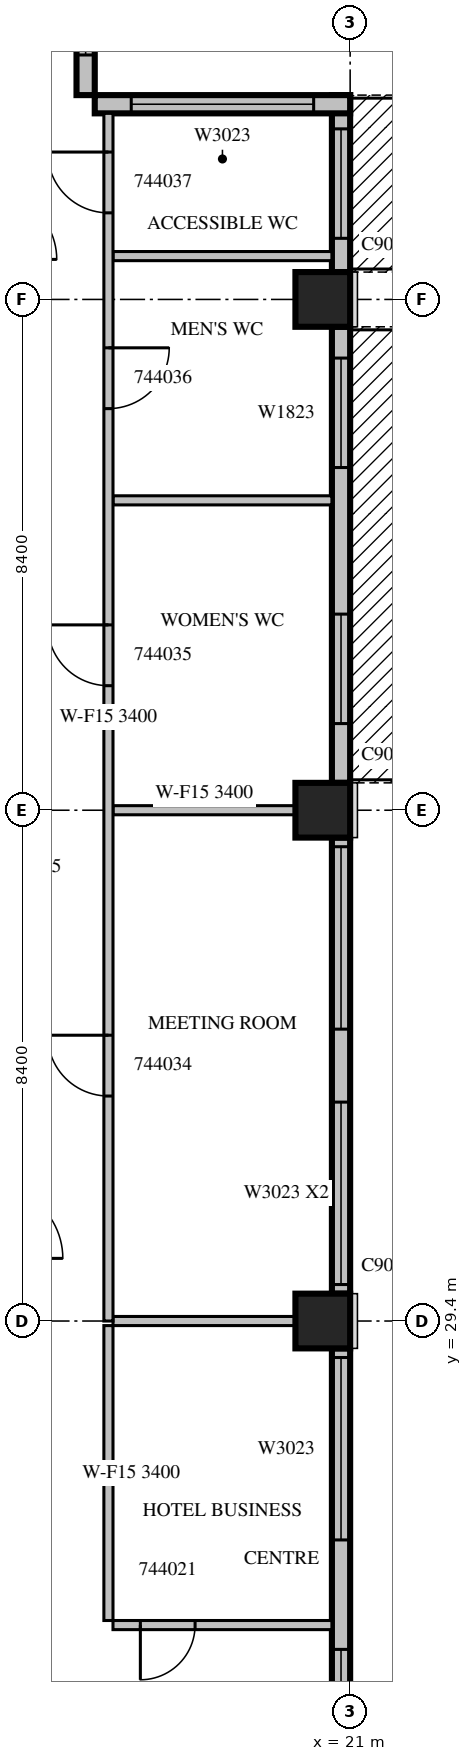
"""IFC4 building model, lengths in metres.
Left out: names, types, materials, properties, quantities, classifications, styles, units other than length and angle.
Written with IfcOpenShell. Run it as: python <this file> out.ifc"""

import sys

from ifc_helpers import new_model, si_unit, direction, frame, frame_2d, origin, origin_2d, place, context, subcontext, project, spatial, rectangle, extrude, source, transform, mapped, element, fill, save


model = new_model("IFC4")
c1 = context("Model", 3, precision=1e-05, world=origin(), true_north=direction((0.0, 1.0)))
c2 = subcontext(c1, "Body", "Model", "MODEL_VIEW")
j1 = project(units=[si_unit("LENGTHUNIT", "METRE"), si_unit("PLANEANGLEUNIT", "RADIAN")], contexts=[c1])
p1 = place(None, origin())
s1 = spatial("IfcSite", under=j1, at=p1, CompositionType="ELEMENT")
p2 = place(p1, origin())
s2 = spatial("IfcBuilding", under=s1, at=p2, CompositionType="ELEMENT")
p3 = place(p2, frame((0.0, 0.0, 200.6)))
s3 = spatial("IfcBuildingStorey", under=s2, at=p3, CompositionType="ELEMENT", Elevation=200.6)
m1 = source(origin(), c2, "Body", "SweptSolid", [
    extrude(rectangle(XDim=0.9, YDim=0.9, at=origin_2d()), origin(), (0.0, 0.0, 1.0), 3.8),
])
for number, where, z_axis, x_axis in (
    (1, (20.55, 29.4, 0.0), (0.0, 0.0, 1.0), (1.0, 0.0, 0.0)),
    (2, (20.55, 37.8, 0.0), (0.0, 0.0, 1.0), (1.0, 0.0, 0.0)),
    (3, (20.55, 46.2, 0.0), (0.0, 0.0, 1.0), (1.0, 0.0, 0.0)),
):
    element("IfcColumn", number, at=place(p3, frame(where, z_axis=z_axis, x_axis=x_axis)), inside=s3, PredefinedType="COLUMN", context=c2, shape_type="MappedRepresentation", body=[
        mapped(m1, transform((0.0, 0.0, 0.0), scale=1.0)),
    ])
m2 = source(origin(), c2, "Body", "SweptSolid", [
    extrude(rectangle(XDim=7.15, YDim=0.3, at=frame_2d((3.575, 0.0))), origin(), (0.0, 0.0, 1.0), 3.4),
])
p4 = place(p3, frame((20.85, 21.8, 0.0), z_axis=(0.0, 0.0, 1.0), x_axis=(0.0, 1.0, 0.0)))
e4 = element("IfcWall", 4, at=p4, inside=s3, PredefinedType="STANDARD", context=c2, shape_type="MappedRepresentation", body=[
    mapped(m2, transform((0.0, 0.0, 0.0), scale=1.0)),
])
m3 = source(origin(), c2, "Body", "SweptSolid", [
    extrude(rectangle(XDim=1.8, YDim=2.3, at=frame_2d((0.9, 1.15))), frame((0.0, 0.16, 0.0), z_axis=(0.0, -1.0, 0.0), x_axis=(1.0, 0.0, 0.0)), (0.0, 0.0, 1.0), 0.32),
])
p5 = place(p4, frame((0.4, 0.0, 0.6)))
e5 = element("IfcOpeningElement", 5, at=p5, cuts=e4, PredefinedType="OPENING", context=c2, shape_type="MappedRepresentation", body=[
    mapped(m3, transform((0.0, 0.0, 0.0), scale=1.0)),
])
m4 = source(origin(), c2, "Body", "SweptSolid", [
    extrude(rectangle(XDim=3.0, YDim=2.3, at=frame_2d((1.5, 1.15))), frame((0.0, 0.16, 0.0), z_axis=(0.0, -1.0, 0.0), x_axis=(1.0, 0.0, 0.0)), (0.0, 0.0, 1.0), 0.32),
])
p6 = place(p4, frame((4.0, 0.0, 0.6)))
e6 = element("IfcOpeningElement", 6, at=p6, cuts=e4, PredefinedType="OPENING", context=c2, shape_type="MappedRepresentation", body=[
    mapped(m4, transform((0.0, 0.0, 0.0), scale=1.0)),
])
m5 = source(origin(), c2, "Body", "SweptSolid", [
    extrude(rectangle(XDim=7.5, YDim=0.3, at=frame_2d((3.75, 0.0))), origin(), (0.0, 0.0, 1.0), 3.4),
])
p7 = place(p3, frame((20.85, 29.85, 0.0), z_axis=(0.0, 0.0, 1.0), x_axis=(0.0, 1.0, 0.0)))
e7 = element("IfcWall", 7, at=p7, inside=s3, PredefinedType="STANDARD", context=c2, shape_type="MappedRepresentation", body=[
    mapped(m5, transform((0.0, 0.0, 0.0), scale=1.0)),
])
p8 = place(p7, frame((0.15, 0.0, 0.6)))
e8 = element("IfcOpeningElement", 8, at=p8, cuts=e7, PredefinedType="OPENING", context=c2, shape_type="MappedRepresentation", body=[
    mapped(m4, transform((0.0, 0.0, 0.0), scale=1.0)),
])
p9 = place(p7, frame((4.35, 0.0, 0.6)))
e9 = element("IfcOpeningElement", 9, at=p9, cuts=e7, PredefinedType="OPENING", context=c2, shape_type="MappedRepresentation", body=[
    mapped(m4, transform((0.0, 0.0, 0.0), scale=1.0)),
])
p10 = place(p3, frame((20.85, 38.25, 0.0), z_axis=(0.0, 0.0, 1.0), x_axis=(0.0, 1.0, 0.0)))
e10 = element("IfcWall", 10, at=p10, inside=s3, PredefinedType="STANDARD", context=c2, shape_type="MappedRepresentation", body=[
    mapped(m5, transform((0.0, 0.0, 0.0), scale=1.0)),
])
m6 = source(origin(), c2, "Body", "SweptSolid", [
    extrude(rectangle(XDim=1.8, YDim=2.4, at=frame_2d((0.9, 1.2))), frame((0.0, 0.16, 0.0), z_axis=(0.0, -1.0, 0.0), x_axis=(1.0, 0.0, 0.0)), (0.0, 0.0, 1.0), 0.32),
])
p11 = place(p10, frame((0.975, 0.0, 0.0)))
e11 = element("IfcOpeningElement", 11, at=p11, cuts=e10, PredefinedType="OPENING", context=c2, shape_type="MappedRepresentation", body=[
    mapped(m6, transform((0.0, 0.0, 0.0), scale=1.0)),
])
p12 = place(p10, frame((5.186, 0.0, 0.6)))
e12 = element("IfcOpeningElement", 12, at=p12, cuts=e10, PredefinedType="OPENING", context=c2, shape_type="MappedRepresentation", body=[
    mapped(m3, transform((0.0, 0.0, 0.0), scale=1.0)),
])
m7 = source(origin(), c2, "Body", "SweptSolid", [
    extrude(rectangle(XDim=2.91, YDim=0.3, at=frame_2d((1.455, 0.0))), origin(), (0.0, 0.0, 1.0), 3.4),
])
p13 = place(p3, frame((20.85, 46.65, 0.0), z_axis=(0.0, 0.0, 1.0), x_axis=(0.0, 1.0, 0.0)))
e13 = element("IfcWall", 13, at=p13, inside=s3, PredefinedType="STANDARD", context=c2, shape_type="MappedRepresentation", body=[
    mapped(m7, transform((0.0, 0.0, 0.0), scale=1.0)),
])
p14 = place(p13, frame((0.555, 0.0, 0.0)))
e14 = element("IfcOpeningElement", 14, at=p14, cuts=e13, PredefinedType="OPENING", context=c2, shape_type="MappedRepresentation", body=[
    mapped(m6, transform((0.0, 0.0, 0.0), scale=1.0)),
])
m8 = source(origin(), c2, "Body", "SweptSolid", [
    extrude(rectangle(XDim=4.2, YDim=0.3, at=frame_2d((2.1, 0.0))), origin(), (0.0, 0.0, 1.0), 3.4),
])
p15 = place(p3, frame((21.0, 49.41, 0.0), z_axis=(0.0, 0.0, 1.0), x_axis=(-1.0, 0.0, 0.0)))
e15 = element("IfcWall", 15, at=p15, inside=s3, PredefinedType="STANDARD", context=c2, shape_type="MappedRepresentation", body=[
    mapped(m8, transform((0.0, 0.0, 0.0), scale=1.0)),
])
p16 = place(p15, frame((0.6, 0.0, 0.6)))
e16 = element("IfcOpeningElement", 16, at=p16, cuts=e15, PredefinedType="OPENING", context=c2, shape_type="MappedRepresentation", body=[
    mapped(m4, transform((0.0, 0.0, 0.0), scale=1.0)),
])
m9 = source(origin(), c2, "Body", "SweptSolid", [
    extrude(rectangle(XDim=2.52, YDim=0.3, at=frame_2d((1.26, 0.0))), origin(), (0.0, 0.0, 1.0), 3.4),
])
p17 = place(p3, frame((16.65, 49.56, 0.0), z_axis=(0.0, 0.0, 1.0), x_axis=(0.0, 1.0, 0.0)))
e17 = element("IfcWall", 17, at=p17, inside=s3, PredefinedType="STANDARD", context=c2, shape_type="MappedRepresentation", body=[
    mapped(m9, transform((0.0, 0.0, 0.0), scale=1.0)),
])
m10 = source(origin(), c2, "Body", "SweptSolid", [
    extrude(rectangle(XDim=1.2, YDim=2.3, at=frame_2d((0.6, 1.15))), frame((0.0, 0.16, 0.0), z_axis=(0.0, -1.0, 0.0), x_axis=(1.0, 0.0, 0.0)), (0.0, 0.0, 1.0), 0.32),
])
p18 = place(p17, frame((0.66, 0.0, 0.6)))
e18 = element("IfcOpeningElement", 18, at=p18, cuts=e17, PredefinedType="OPENING", context=c2, shape_type="MappedRepresentation", body=[
    mapped(m10, transform((0.0, 0.0, 0.0), scale=1.0)),
])
m11 = source(origin(), c2, "Body", "SweptSolid", [
    extrude(rectangle(XDim=3.6, YDim=0.15, at=frame_2d((1.8, 0.0))), origin(), (0.0, 0.0, 1.0), 3.4),
])
p19 = place(p3, frame((17.1, 24.4, 0.0), z_axis=(0.0, 0.0, 1.0), x_axis=(1.0, 0.0, 0.0)))
e19 = element("IfcWall", 19, at=p19, inside=s3, PredefinedType="PARTITIONING", context=c2, shape_type="MappedRepresentation", body=[
    mapped(m11, transform((0.0, 0.0, 0.0), scale=1.0)),
])
m12 = source(origin(), c2, "Body", "SweptSolid", [
    extrude(rectangle(XDim=0.9, YDim=2.1, at=frame_2d((0.45, 1.05))), frame((0.0, 0.085, 0.0), z_axis=(0.0, -1.0, 0.0), x_axis=(1.0, 0.0, 0.0)), (0.0, 0.0, 1.0), 0.17),
])
p20 = place(p19, frame((0.45, 0.0, 0.0)))
e20 = element("IfcOpeningElement", 20, at=p20, cuts=e19, PredefinedType="OPENING", context=c2, shape_type="MappedRepresentation", body=[
    mapped(m12, transform((0.0, 0.0, 0.0), scale=1.0)),
])
m13 = source(origin(), c2, "Body", "SweptSolid", [
    extrude(rectangle(XDim=4.85, YDim=0.15, at=frame_2d((2.425, 0.0))), origin(), (0.0, 0.0, 1.0), 3.4),
])
p21 = place(p3, frame((17.025, 29.325, 0.0), z_axis=(0.0, 0.0, 1.0), x_axis=(0.0, -1.0, 0.0)))
e21 = element("IfcWall", 21, at=p21, inside=s3, PredefinedType="PARTITIONING", context=c2, shape_type="MappedRepresentation", body=[
    mapped(m13, transform((0.0, 0.0, 0.0), scale=1.0)),
])
m14 = source(origin(), c2, "Body", "SweptSolid", [
    extrude(rectangle(XDim=3.001, YDim=0.15, at=frame_2d((1.5, 0.0))), origin(), (0.0, 0.0, 1.0), 3.4),
])
p22 = place(p3, frame((20.101, 29.4, 0.0), z_axis=(0.0, 0.0, 1.0), x_axis=(-1.0, 0.0, 0.0)))
e22 = element("IfcWall", 22, at=p22, inside=s3, PredefinedType="PARTITIONING", context=c2, shape_type="MappedRepresentation", body=[
    mapped(m14, transform((0.0, 0.0, 0.0), scale=1.0)),
])
for number, where, z_axis, x_axis in (
    (23, (17.1, 42.896, 0.0), (0.0, 0.0, 1.0), (1.0, 0.0, 0.0)),
    (24, (17.1, 46.913, 0.0), (0.0, 0.0, 1.0), (1.0, 0.0, 0.0)),
):
    element("IfcWall", number, at=place(p3, frame(where, z_axis=z_axis, x_axis=x_axis)), inside=s3, PredefinedType="PARTITIONING", context=c2, shape_type="MappedRepresentation", body=[
        mapped(m11, transform((0.0, 0.0, 0.0), scale=1.0)),
    ])
p23 = place(p3, frame((20.101, 37.8, 0.0), z_axis=(0.0, 0.0, 1.0), x_axis=(-1.0, 0.0, 0.0)))
e25 = element("IfcWall", 25, at=p23, inside=s3, PredefinedType="PARTITIONING", context=c2, shape_type="MappedRepresentation", body=[
    mapped(m14, transform((0.0, 0.0, 0.0), scale=1.0)),
])
m15 = source(origin(), c2, "Body", "SweptSolid", [
    extrude(rectangle(XDim=19.86, YDim=0.15, at=frame_2d((9.93, 0.0))), origin(), (0.0, 0.0, 1.0), 3.4),
])
p24 = place(p3, frame((17.025, 49.26, 0.0), z_axis=(0.0, 0.0, 1.0), x_axis=(0.0, -1.0, 0.0)))
e26 = element("IfcWall", 26, at=p24, inside=s3, PredefinedType="PARTITIONING", context=c2, shape_type="MappedRepresentation", body=[
    mapped(m15, transform((0.0, 0.0, 0.0), scale=1.0)),
])
m16 = source(origin(), c2, "Body", "SweptSolid", [
    extrude(rectangle(XDim=1.0, YDim=2.1, at=frame_2d((0.5, 1.05))), frame((0.0, 0.085, 0.0), z_axis=(0.0, -1.0, 0.0), x_axis=(1.0, 0.0, 0.0)), (0.0, 0.0, 1.0), 0.17),
])
p25 = place(p24, frame((15.16, 0.0, 0.0)))
e27 = element("IfcOpeningElement", 27, at=p25, cuts=e26, PredefinedType="OPENING", context=c2, shape_type="MappedRepresentation", body=[
    mapped(m16, transform((0.0, 0.0, 0.0), scale=1.0)),
])
p26 = place(p24, frame((8.412, 0.0, 0.0)))
e28 = element("IfcOpeningElement", 28, at=p26, cuts=e26, PredefinedType="OPENING", context=c2, shape_type="MappedRepresentation", body=[
    mapped(m16, transform((0.0, 0.0, 0.0), scale=1.0)),
])
p27 = place(p24, frame((3.856, 0.0, 0.0)))
e29 = element("IfcOpeningElement", 29, at=p27, cuts=e26, PredefinedType="OPENING", context=c2, shape_type="MappedRepresentation", body=[
    mapped(m16, transform((0.0, 0.0, 0.0), scale=1.0)),
])
p28 = place(p24, frame((0.636, 0.0, 0.0)))
e30 = element("IfcOpeningElement", 30, at=p28, cuts=e26, PredefinedType="OPENING", context=c2, shape_type="MappedRepresentation", body=[
    mapped(m16, transform((0.0, 0.0, 0.0), scale=1.0)),
])
m17 = source(origin(), c2, "Body", "SweptSolid", [
    extrude(rectangle(XDim=1.8, YDim=2.3, at=frame_2d((0.9, 1.15))), frame((0.0, 0.03, 0.0), z_axis=(0.0, -1.0, 0.0), x_axis=(1.0, 0.0, 0.0)), (0.0, 0.0, 1.0), 0.06),
])
p29 = place(p5, origin())
e31 = element("IfcWindow", 31, at=p29, inside=s3, PartitioningType="SINGLE_PANEL", PredefinedType="WINDOW", context=c2, shape_type="MappedRepresentation", body=[
    mapped(m17, transform((0.0, 0.0, 0.0), scale=1.0)),
])
fill(e5, e31)
m18 = source(origin(), c2, "Body", "SweptSolid", [
    extrude(rectangle(XDim=3.0, YDim=2.3, at=frame_2d((1.5, 1.15))), frame((0.0, 0.03, 0.0), z_axis=(0.0, -1.0, 0.0), x_axis=(1.0, 0.0, 0.0)), (0.0, 0.0, 1.0), 0.06),
])
p30 = place(p6, origin())
e32 = element("IfcWindow", 32, at=p30, inside=s3, PartitioningType="SINGLE_PANEL", PredefinedType="WINDOW", context=c2, shape_type="MappedRepresentation", body=[
    mapped(m18, transform((0.0, 0.0, 0.0), scale=1.0)),
])
fill(e6, e32)
p31 = place(p8, origin())
e33 = element("IfcWindow", 33, at=p31, inside=s3, PartitioningType="SINGLE_PANEL", PredefinedType="WINDOW", context=c2, shape_type="MappedRepresentation", body=[
    mapped(m18, transform((0.0, 0.0, 0.0), scale=1.0)),
])
fill(e8, e33)
p32 = place(p9, origin())
e34 = element("IfcWindow", 34, at=p32, inside=s3, PartitioningType="SINGLE_PANEL", PredefinedType="WINDOW", context=c2, shape_type="MappedRepresentation", body=[
    mapped(m18, transform((0.0, 0.0, 0.0), scale=1.0)),
])
fill(e9, e34)
m19 = source(origin(), c2, "Body", "SweptSolid", [
    extrude(rectangle(XDim=1.8, YDim=2.4, at=frame_2d((0.9, 1.2))), frame((0.0, 0.025, 0.0), z_axis=(0.0, -1.0, 0.0), x_axis=(1.0, 0.0, 0.0)), (0.0, 0.0, 1.0), 0.05),
])
p33 = place(p11, origin())
e35 = element("IfcDoor", 35, at=p33, inside=s3, OperationType="SLIDING_TO_LEFT", PredefinedType="DOOR", context=c2, shape_type="MappedRepresentation", body=[
    mapped(m19, transform((0.0, 0.0, 0.0), scale=1.0)),
])
fill(e11, e35)
p34 = place(p12, origin())
e36 = element("IfcWindow", 36, at=p34, inside=s3, PartitioningType="SINGLE_PANEL", PredefinedType="WINDOW", context=c2, shape_type="MappedRepresentation", body=[
    mapped(m17, transform((0.0, 0.0, 0.0), scale=1.0)),
])
fill(e12, e36)
p35 = place(p14, origin())
e37 = element("IfcDoor", 37, at=p35, inside=s3, OperationType="SLIDING_TO_LEFT", PredefinedType="DOOR", context=c2, shape_type="MappedRepresentation", body=[
    mapped(m19, transform((0.0, 0.0, 0.0), scale=1.0)),
])
fill(e14, e37)
p36 = place(p16, origin())
e38 = element("IfcWindow", 38, at=p36, inside=s3, PartitioningType="SINGLE_PANEL", PredefinedType="WINDOW", context=c2, shape_type="MappedRepresentation", body=[
    mapped(m18, transform((0.0, 0.0, 0.0), scale=1.0)),
])
fill(e16, e38)
m20 = source(origin(), c2, "Body", "SweptSolid", [
    extrude(rectangle(XDim=1.2, YDim=2.3, at=frame_2d((0.6, 1.15))), frame((0.0, 0.03, 0.0), z_axis=(0.0, -1.0, 0.0), x_axis=(1.0, 0.0, 0.0)), (0.0, 0.0, 1.0), 0.06),
])
p37 = place(p18, origin())
e39 = element("IfcWindow", 39, at=p37, inside=s3, PartitioningType="SINGLE_PANEL", PredefinedType="WINDOW", context=c2, shape_type="MappedRepresentation", body=[
    mapped(m20, transform((0.0, 0.0, 0.0), scale=1.0)),
])
fill(e18, e39)
m21 = source(origin(), c2, "Body", "SweptSolid", [
    extrude(rectangle(XDim=0.9, YDim=2.1, at=frame_2d((0.45, 1.05))), frame((0.0, 0.025, 0.0), z_axis=(0.0, -1.0, 0.0), x_axis=(1.0, 0.0, 0.0)), (0.0, 0.0, 1.0), 0.05),
])
p38 = place(p20, origin())
e40 = element("IfcDoor", 40, at=p38, inside=s3, OperationType="SINGLE_SWING_RIGHT", PredefinedType="DOOR", context=c2, shape_type="MappedRepresentation", body=[
    mapped(m21, transform((0.0, 0.0, 0.0), scale=1.0)),
])
fill(e20, e40)
m22 = source(origin(), c2, "Body", "SweptSolid", [
    extrude(rectangle(XDim=1.0, YDim=2.1, at=frame_2d((0.5, 1.05))), frame((0.0, 0.025, 0.0), z_axis=(0.0, -1.0, 0.0), x_axis=(1.0, 0.0, 0.0)), (0.0, 0.0, 1.0), 0.05),
])
p39 = place(p25, origin())
e41 = element("IfcDoor", 41, at=p39, inside=s3, OperationType="SINGLE_SWING_RIGHT", PredefinedType="DOOR", context=c2, shape_type="MappedRepresentation", body=[
    mapped(m22, transform((0.0, 0.0, 0.0), scale=1.0)),
])
fill(e27, e41)
p40 = place(p26, origin())
e42 = element("IfcDoor", 42, at=p40, inside=s3, OperationType="SINGLE_SWING_RIGHT", PredefinedType="DOOR", context=c2, shape_type="MappedRepresentation", body=[
    mapped(m22, transform((0.0, 0.0, 0.0), scale=1.0)),
])
fill(e28, e42)
p41 = place(p27, origin())
e43 = element("IfcDoor", 43, at=p41, inside=s3, OperationType="SINGLE_SWING_LEFT", PredefinedType="DOOR", context=c2, shape_type="MappedRepresentation", body=[
    mapped(m22, transform((0.0, 0.0, 0.0), scale=1.0)),
])
fill(e29, e43)
p42 = place(p28, origin())
e44 = element("IfcDoor", 44, at=p42, inside=s3, OperationType="SINGLE_SWING_RIGHT", PredefinedType="DOOR", context=c2, shape_type="MappedRepresentation", body=[
    mapped(m22, transform((0.0, 0.0, 0.0), scale=1.0)),
])
fill(e30, e44)
save(model, sys.argv[1])
